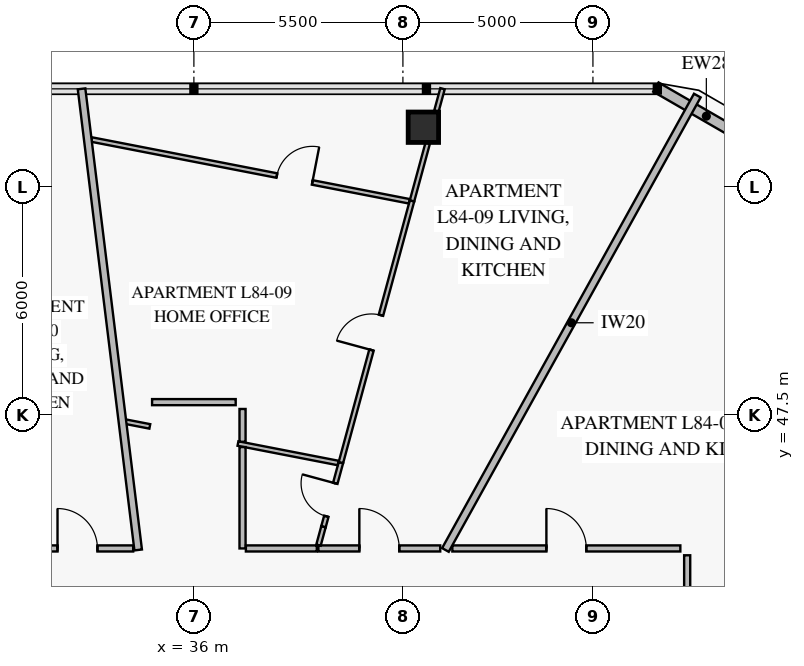
"""IFC4 building model, lengths in metres.
Left out: names, types, materials, properties, quantities, classifications, styles, units other than length and angle.
Written with IfcOpenShell. Run it as: python <this file> out.ifc"""

import sys

from ifc_helpers import new_model, si_unit, direction, frame, frame_2d, origin, origin_2d, place, context, subcontext, project, spatial, rectangle, extrude, element, fill, save


model = new_model("IFC4")
c1 = context("Model", 3, precision=1e-05, world=origin(), true_north=direction((0.0, 1.0)))
c2 = subcontext(c1, "Body", "Model", "MODEL_VIEW")
j1 = project(units=[si_unit("LENGTHUNIT", "METRE"), si_unit("PLANEANGLEUNIT", "RADIAN")], contexts=[c1])
p1 = place(None, origin())
s1 = spatial("IfcSite", under=j1, at=p1, CompositionType="ELEMENT")
p2 = place(p1, origin())
s2 = spatial("IfcBuilding", under=s1, at=p2, CompositionType="ELEMENT")
p3 = place(p2, frame((0.0, 0.0, 331.0)))
s3 = spatial("IfcBuildingStorey", under=s2, at=p3, CompositionType="ELEMENT", Elevation=331.0)
p4 = place(p3, frame((42.039, 55.064, 0.0), z_axis=(0.0, 0.0, 1.0), x_axis=(-1.0, 0.0, 0.0)))
e1 = element("IfcColumn", 1, at=p4, inside=s3, PredefinedType="COLUMN", context=c2, shape_type="SweptSolid", body=[
    extrude(rectangle(XDim=0.8, YDim=0.8, at=origin_2d()), origin(), (0.0, 0.0, 1.0), 3.55),
])
p5 = place(p3, frame((48.157, 56.122, 0.0), z_axis=(0.0, 0.0, 1.0), x_axis=(0.866023752521, -0.50000286006, 0.0)))
e2 = element("IfcWall", 2, at=p5, inside=s3, PredefinedType="SOLIDWALL", context=c2, shape_type="SweptSolid", body=[
    extrude(rectangle(XDim=3.065, YDim=0.28, at=frame_2d((1.532, 0.0))), origin(), (0.0, 0.0, 1.0), 3.55),
])
p6 = place(p3, frame((48.8, 43.98, 0.0), z_axis=(0.0, 0.0, 1.0), x_axis=(-1.0, 0.0, 0.0)))
e3 = element("IfcWall", 3, at=p6, inside=s3, PredefinedType="PARTITIONING", context=c2, shape_type="SweptSolid", body=[
    extrude(rectangle(XDim=5.999, YDim=0.16, at=frame_2d((3.0, 0.0))), origin(), (0.0, 0.0, 1.0), 3.0),
])
p7 = place(p6, frame((2.475, 0.0, 0.0)))
e4 = element("IfcOpeningElement", 4, at=p7, cuts=e3, PredefinedType="OPENING", context=c2, shape_type="SweptSolid", body=[
    extrude(rectangle(XDim=1.05, YDim=2.15, at=frame_2d((0.525, 1.075))), frame((0.0, 0.092, 0.0), z_axis=(0.0, -1.0, 0.0), x_axis=(1.0, 0.0, 0.0)), (0.0, 0.0, 1.0), 0.184),
])
p8 = place(p3, frame((39.41, 44.55, 0.0), z_axis=(0.0, 0.0, 1.0), x_axis=(0.262173284377, 0.965020812708, 0.0)))
e5 = element("IfcWall", 5, at=p8, inside=s3, PredefinedType="PARTITIONING", context=c2, shape_type="SweptSolid", body=[
    extrude(rectangle(XDim=1.751, YDim=0.12, at=frame_2d((0.875, 0.0))), origin(), (0.0, 0.0, 1.0), 3.0),
])
p9 = place(p8, frame((0.285, 0.0, 0.0)))
e6 = element("IfcOpeningElement", 6, at=p9, cuts=e5, PredefinedType="OPENING", context=c2, shape_type="SweptSolid", body=[
    extrude(rectangle(XDim=0.9, YDim=2.1, at=frame_2d((0.45, 1.05))), frame((0.0, 0.072, 0.0), z_axis=(0.0, -1.0, 0.0), x_axis=(1.0, 0.0, 0.0)), (0.0, 0.0, 1.0), 0.144),
])
p10 = place(p3, frame((39.869, 46.24, 0.0), z_axis=(0.0, 0.0, 1.0), x_axis=(0.262173652668, 0.965020712652, 0.0)))
e7 = element("IfcWall", 7, at=p10, inside=s3, PredefinedType="PARTITIONING", context=c2, shape_type="SweptSolid", body=[
    extrude(rectangle(XDim=7.137, YDim=0.12, at=frame_2d((3.568, 0.0))), origin(), (0.0, 0.0, 1.0), 3.0),
])
p11 = place(p10, frame((3.068, 0.0, 0.0)))
e8 = element("IfcOpeningElement", 8, at=p11, cuts=e7, PredefinedType="OPENING", context=c2, shape_type="SweptSolid", body=[
    extrude(rectangle(XDim=0.95, YDim=2.1, at=frame_2d((0.475, 1.05))), frame((0.0, 0.072, 0.0), z_axis=(0.0, -1.0, 0.0), x_axis=(1.0, 0.0, 0.0)), (0.0, 0.0, 1.0), 0.144),
])
p12 = place(p3, frame((41.667, 53.115, 0.0), z_axis=(0.0, 0.0, 1.0), x_axis=(-0.981630458745, 0.190792144662, 0.0)))
e9 = element("IfcWall", 9, at=p12, inside=s3, PredefinedType="PARTITIONING", context=c2, shape_type="SweptSolid", body=[
    extrude(rectangle(XDim=8.515, YDim=0.12, at=frame_2d((4.257, 0.0))), origin(), (0.0, 0.0, 1.0), 3.0),
])
p13 = place(p12, frame((2.598, 0.0, 0.0)))
e10 = element("IfcOpeningElement", 10, at=p13, cuts=e9, PredefinedType="OPENING", context=c2, shape_type="SweptSolid", body=[
    extrude(rectangle(XDim=0.95, YDim=2.1, at=frame_2d((0.475, 1.05))), frame((0.0, 0.072, 0.0), z_axis=(0.0, -1.0, 0.0), x_axis=(1.0, 0.0, 0.0)), (0.0, 0.0, 1.0), 0.144),
])
p14 = place(p3, frame((42.482, 43.98, 0.0), z_axis=(0.0, 0.0, 1.0), x_axis=(-1.0, 0.0, 0.0)))
e11 = element("IfcWall", 11, at=p14, inside=s3, PredefinedType="PARTITIONING", context=c2, shape_type="SweptSolid", body=[
    extrude(rectangle(XDim=3.206, YDim=0.16, at=frame_2d((1.603, 0.0))), origin(), (0.0, 0.0, 1.0), 3.55),
])
p15 = place(p14, frame((1.078, 0.0, 0.0)))
e12 = element("IfcOpeningElement", 12, at=p15, cuts=e11, PredefinedType="OPENING", context=c2, shape_type="SweptSolid", body=[
    extrude(rectangle(XDim=1.05, YDim=2.15, at=frame_2d((0.525, 1.075))), frame((0.0, 0.092, 0.0), z_axis=(0.0, -1.0, 0.0), x_axis=(1.0, 0.0, 0.0)), (0.0, 0.0, 1.0), 0.184),
])
p16 = place(p3, frame((34.403, 43.98, 0.0), z_axis=(0.0, 0.0, 1.0), x_axis=(-1.0, 0.0, 0.0)))
e13 = element("IfcWall", 13, at=p16, inside=s3, PredefinedType="PARTITIONING", context=c2, shape_type="SweptSolid", body=[
    extrude(rectangle(XDim=2.932, YDim=0.16, at=frame_2d((1.466, 0.0))), origin(), (0.0, 0.0, 1.0), 3.0),
])
p17 = place(p16, frame((0.941, 0.0, 0.0)))
e14 = element("IfcOpeningElement", 14, at=p17, cuts=e13, PredefinedType="OPENING", context=c2, shape_type="SweptSolid", body=[
    extrude(rectangle(XDim=1.05, YDim=2.15, at=frame_2d((0.525, 1.075))), frame((0.0, 0.092, 0.0), z_axis=(0.0, -1.0, 0.0), x_axis=(1.0, 0.0, 0.0)), (0.0, 0.0, 1.0), 0.184),
])
p18 = place(p3, frame((42.618, 43.94, 0.0), z_axis=(0.0, 0.0, 1.0), x_axis=(0.484817892783, 0.874615121546, 0.0)))
e15 = element("IfcWall", 15, at=p18, inside=s3, PredefinedType="PARTITIONING", context=c2, shape_type="SweptSolid", body=[
    extrude(rectangle(XDim=13.671, YDim=0.2, at=frame_2d((6.836, 0.0))), origin(), (0.0, 0.0, 1.0), 2.97),
])
p19 = place(p3, frame((39.279, 44.068, 0.0), z_axis=(0.0, 0.0, 1.0), x_axis=(0.262496924618, 0.964932829044, 0.0)))
e16 = element("IfcWall", 16, at=p19, inside=s3, PredefinedType="PARTITIONING", context=c2, shape_type="SweptSolid", body=[
    extrude(rectangle(XDim=0.5, YDim=0.12, at=frame_2d((0.25, 0.0))), origin(), (0.0, 0.0, 1.0), 3.0),
])
p20 = place(p3, frame((41.74, 53.127, 0.0), z_axis=(0.0, 0.0, 1.0), x_axis=(0.262250179099, 0.964999918944, 0.0)))
e17 = element("IfcWall", 17, at=p20, inside=s3, PredefinedType="PARTITIONING", context=c2, shape_type="SweptSolid", body=[
    extrude(rectangle(XDim=1.572, YDim=0.12, at=frame_2d((0.786, 0.0))), origin(), (0.0, 0.0, 1.0), 3.0),
])
p21 = place(p3, frame((42.381, 55.484, 0.0), z_axis=(0.0, 0.0, 1.0), x_axis=(0.262177554605, 0.965019652578, 0.0)))
e18 = element("IfcWall", 18, at=p21, inside=s3, PredefinedType="PARTITIONING", context=c2, shape_type="SweptSolid", body=[
    extrude(rectangle(XDim=0.615, YDim=0.12, at=frame_2d((0.308, 0.0))), origin(), (0.0, 0.0, 1.0), 3.55),
])
p22 = place(p3, frame((39.795, 46.229, 0.0), z_axis=(0.0, 0.0, 1.0), x_axis=(-0.981632896255, 0.190779603181, 0.0)))
e19 = element("IfcWall", 19, at=p22, inside=s3, PredefinedType="PARTITIONING", context=c2, shape_type="SweptSolid", body=[
    extrude(rectangle(XDim=2.685, YDim=0.12, at=frame_2d((1.342, 0.0))), origin(), (0.0, 0.0, 1.0), 3.0),
])
p23 = place(p3, frame((34.84, 47.192, 0.0), z_axis=(0.0, 0.0, 1.0), x_axis=(-0.981613573496, 0.190878999183, 0.0)))
e20 = element("IfcWall", 20, at=p23, inside=s3, PredefinedType="PARTITIONING", context=c2, shape_type="SweptSolid", body=[
    extrude(rectangle(XDim=0.7, YDim=0.12, at=frame_2d((0.35, 0.0))), origin(), (0.0, 0.0, 1.0), 3.55),
])
p24 = place(p3, frame((34.534, 43.94, 0.0), z_axis=(0.0, 0.0, 1.0), x_axis=(-0.121856786941, 0.992547693301, 0.0)))
e21 = element("IfcWall", 21, at=p24, inside=s3, PredefinedType="PARTITIONING", context=c2, shape_type="SweptSolid", body=[
    extrude(rectangle(XDim=12.225, YDim=0.2, at=frame_2d((6.113, 0.0))), origin(), (0.0, 0.0, 1.0), 2.97),
])
p25 = place(p3, frame((48.98, 41.637, 0.0), z_axis=(0.0, 0.0, 1.0), x_axis=(0.0, 1.0, 0.0)))
e22 = element("IfcWall", 22, at=p25, inside=s3, PredefinedType="PARTITIONING", context=c2, shape_type="SweptSolid", body=[
    extrude(rectangle(XDim=2.163, YDim=0.16, at=frame_2d((1.082, 0.0))), origin(), (0.0, 0.0, 1.0), 3.55),
])
p26 = place(p3, frame((37.28, 43.98, 0.0), z_axis=(0.0, 0.0, 1.0), x_axis=(0.0, 1.0, 0.0)))
e23 = element("IfcWall", 23, at=p26, inside=s3, PredefinedType="PARTITIONING", context=c2, shape_type="SweptSolid", body=[
    extrude(rectangle(XDim=2.668, YDim=0.16, at=frame_2d((1.334, 0.0))), origin(), (0.0, 0.0, 1.0), 3.55),
])
p27 = place(p3, frame((39.234, 43.98, 0.0), z_axis=(0.0, 0.0, 1.0), x_axis=(-1.0, 0.0, 0.0)))
e24 = element("IfcWall", 24, at=p27, inside=s3, PredefinedType="PARTITIONING", context=c2, shape_type="SweptSolid", body=[
    extrude(rectangle(XDim=1.866, YDim=0.16, at=frame_2d((0.933, 0.0))), origin(), (0.0, 0.0, 1.0), 3.0),
])
p28 = place(p3, frame((37.1, 47.83, 0.0), z_axis=(0.0, 0.0, 1.0), x_axis=(-1.0, 0.0, 0.0)))
e25 = element("IfcWall", 25, at=p28, inside=s3, PredefinedType="PARTITIONING", context=c2, shape_type="SweptSolid", body=[
    extrude(rectangle(XDim=2.2, YDim=0.16, at=frame_2d((1.1, 0.0))), origin(), (0.0, 0.0, 1.0), 3.55),
])
p29 = place(p3, frame((37.28, 46.787, 0.0), z_axis=(0.0, 0.0, 1.0), x_axis=(0.0, 1.0, 0.0)))
e26 = element("IfcWall", 26, at=p29, inside=s3, PredefinedType="PARTITIONING", context=c2, shape_type="SweptSolid", body=[
    extrude(rectangle(XDim=0.863, YDim=0.16, at=frame_2d((0.432, 0.0))), origin(), (0.0, 0.0, 1.0), 3.55),
])
p30 = place(p7, frame((1.05, 0.0, 0.0), z_axis=(0.0, 0.0, 1.0), x_axis=(-1.0, 0.0, 0.0)))
e27 = element("IfcDoor", 27, at=p30, inside=s3, OperationType="SINGLE_SWING_LEFT", PredefinedType="DOOR", context=c2, shape_type="SweptSolid", body=[
    extrude(rectangle(XDim=1.05, YDim=2.15, at=frame_2d((0.525, 1.075))), frame((0.0, 0.025, 0.0), z_axis=(0.0, -1.0, 0.0), x_axis=(1.0, 0.0, 0.0)), (0.0, 0.0, 1.0), 0.05),
])
fill(e4, e27)
p31 = place(p9, origin())
e28 = element("IfcDoor", 28, at=p31, inside=s3, OperationType="SINGLE_SWING_RIGHT", PredefinedType="DOOR", context=c2, shape_type="SweptSolid", body=[
    extrude(rectangle(XDim=0.9, YDim=2.1, at=frame_2d((0.45, 1.05))), frame((0.0, 0.025, 0.0), z_axis=(0.0, -1.0, 0.0), x_axis=(1.0, 0.0, 0.0)), (0.0, 0.0, 1.0), 0.05),
])
fill(e6, e28)
p32 = place(p11, origin())
e29 = element("IfcDoor", 29, at=p32, inside=s3, OperationType="SINGLE_SWING_LEFT", PredefinedType="DOOR", context=c2, shape_type="SweptSolid", body=[
    extrude(rectangle(XDim=0.95, YDim=2.1, at=frame_2d((0.475, 1.05))), frame((0.0, 0.025, 0.0), z_axis=(0.0, -1.0, 0.0), x_axis=(1.0, 0.0, 0.0)), (0.0, 0.0, 1.0), 0.05),
])
fill(e8, e29)
p33 = place(p13, frame((0.95, 0.0, 0.0), z_axis=(0.0, 0.0, 1.0), x_axis=(-1.0, 0.0, 0.0)))
e30 = element("IfcDoor", 30, at=p33, inside=s3, OperationType="SINGLE_SWING_RIGHT", PredefinedType="DOOR", context=c2, shape_type="SweptSolid", body=[
    extrude(rectangle(XDim=0.95, YDim=2.1, at=frame_2d((0.475, 1.05))), frame((0.0, 0.025, 0.0), z_axis=(0.0, -1.0, 0.0), x_axis=(1.0, 0.0, 0.0)), (0.0, 0.0, 1.0), 0.05),
])
fill(e10, e30)
p34 = place(p15, frame((1.05, 0.0, 0.0), z_axis=(0.0, 0.0, 1.0), x_axis=(-1.0, 0.0, 0.0)))
e31 = element("IfcDoor", 31, at=p34, inside=s3, OperationType="SINGLE_SWING_LEFT", PredefinedType="DOOR", context=c2, shape_type="SweptSolid", body=[
    extrude(rectangle(XDim=1.05, YDim=2.15, at=frame_2d((0.525, 1.075))), frame((0.0, 0.025, 0.0), z_axis=(0.0, -1.0, 0.0), x_axis=(1.0, 0.0, 0.0)), (0.0, 0.0, 1.0), 0.05),
])
fill(e12, e31)
p35 = place(p17, frame((1.05, 0.0, 0.0), z_axis=(0.0, 0.0, 1.0), x_axis=(-1.0, 0.0, 0.0)))
e32 = element("IfcDoor", 32, at=p35, inside=s3, OperationType="SINGLE_SWING_LEFT", PredefinedType="DOOR", context=c2, shape_type="SweptSolid", body=[
    extrude(rectangle(XDim=1.05, YDim=2.15, at=frame_2d((0.525, 1.075))), frame((0.0, 0.025, 0.0), z_axis=(0.0, -1.0, 0.0), x_axis=(1.0, 0.0, 0.0)), (0.0, 0.0, 1.0), 0.05),
])
fill(e14, e32)
save(model, sys.argv[1])
